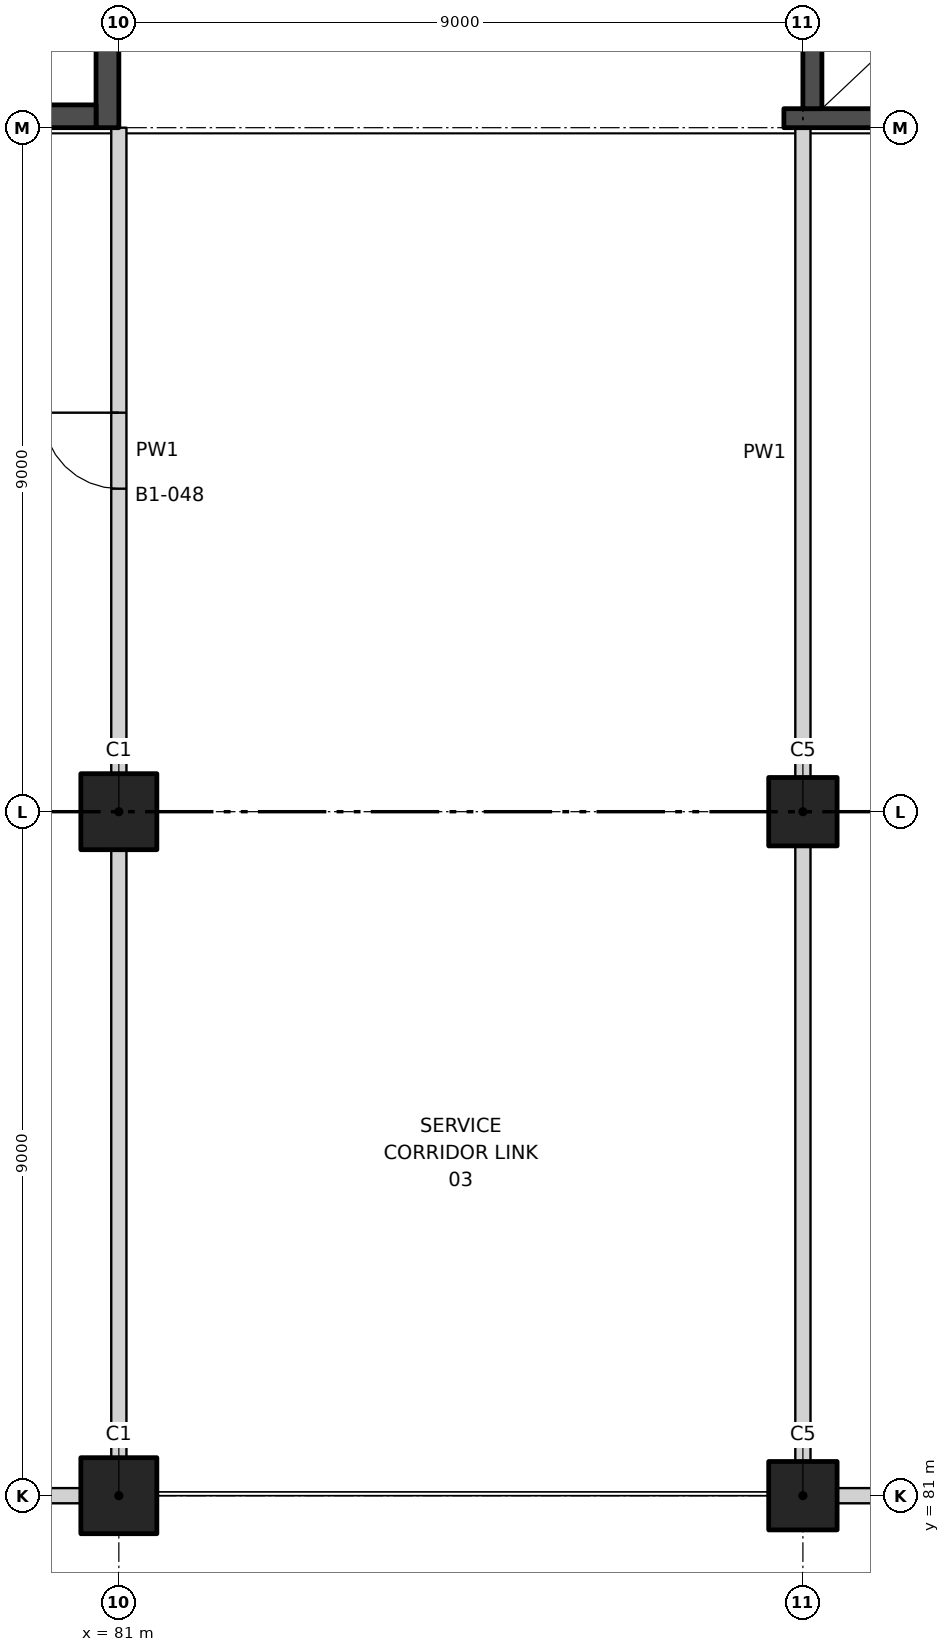
"""IFC4 building model, lengths in metres.
Left out: names, types, materials, properties, quantities, classifications, styles, units other than length and angle.
Written with IfcOpenShell. Run it as: python <this file> out.ifc"""

import sys

from ifc_helpers import new_model, si_unit, direction, frame, frame_2d, origin, origin_2d, place, context, subcontext, project, spatial, rectangle, extrude, element, fill, save


model = new_model("IFC4")
c1 = context("Model", 3, precision=1e-05, world=origin(), true_north=direction((0.0, 1.0)))
c2 = subcontext(c1, "Body", "Model", "MODEL_VIEW")
j1 = project(units=[si_unit("LENGTHUNIT", "METRE"), si_unit("PLANEANGLEUNIT", "RADIAN")], contexts=[c1])
p1 = place(None, origin())
s1 = spatial("IfcSite", under=j1, at=p1, CompositionType="ELEMENT")
p2 = place(p1, origin())
s2 = spatial("IfcBuilding", under=s1, at=p2, CompositionType="ELEMENT")
p3 = place(p2, frame((0.0, 0.0, -6.0)))
s3 = spatial("IfcBuildingStorey", under=s2, at=p3, CompositionType="ELEMENT", Elevation=-6.0)
p4 = place(p3, frame((90.0, 81.0, 0.0), z_axis=(0.0, 0.0, 1.0), x_axis=(1.0, 0.0, 0.0)))
e1 = element("IfcColumn", 1, at=p4, inside=s3, PredefinedType="COLUMN", context=c2, shape_type="SweptSolid", body=[
    extrude(rectangle(XDim=0.9, YDim=0.9, at=origin_2d()), origin(), (0.0, 0.0, 1.0), 6.0),
])
p5 = place(p3, frame((81.0, 81.0, 0.0), z_axis=(0.0, 0.0, 1.0), x_axis=(1.0, 0.0, 0.0)))
e2 = element("IfcColumn", 2, at=p5, inside=s3, PredefinedType="COLUMN", context=c2, shape_type="SweptSolid", body=[
    extrude(rectangle(XDim=1.0, YDim=1.0, at=origin_2d()), origin(), (0.0, 0.0, 1.0), 6.0),
])
p6 = place(p3, frame((90.0, 90.0, 0.0), z_axis=(0.0, 0.0, 1.0), x_axis=(1.0, 0.0, 0.0)))
e3 = element("IfcColumn", 3, at=p6, inside=s3, PredefinedType="COLUMN", context=c2, shape_type="SweptSolid", body=[
    extrude(rectangle(XDim=0.9, YDim=0.9, at=origin_2d()), origin(), (0.0, 0.0, 1.0), 6.0),
])
p7 = place(p3, frame((81.0, 90.0, 0.0), z_axis=(0.0, 0.0, 1.0), x_axis=(1.0, 0.0, 0.0)))
e4 = element("IfcColumn", 4, at=p7, inside=s3, PredefinedType="COLUMN", context=c2, shape_type="SweptSolid", body=[
    extrude(rectangle(XDim=1.0, YDim=1.0, at=origin_2d()), origin(), (0.0, 0.0, 1.0), 6.0),
])
p8 = place(p3, frame((72.2, 81.0, 0.0), z_axis=(0.0, 0.0, 1.0), x_axis=(1.0, 0.0, 0.0)))
e5 = element("IfcWall", 5, at=p8, inside=s3, PredefinedType="PARTITIONING", context=c2, shape_type="SweptSolid", body=[
    extrude(rectangle(XDim=8.3, YDim=0.2, at=frame_2d((4.15, 0.0))), origin(), (0.0, 0.0, 1.0), 4.65),
])
p9 = place(p3, frame((90.45, 81.0, 0.0), z_axis=(0.0, 0.0, 1.0), x_axis=(1.0, 0.0, 0.0)))
e6 = element("IfcWall", 6, at=p9, inside=s3, PredefinedType="PARTITIONING", context=c2, shape_type="SweptSolid", body=[
    extrude(rectangle(XDim=6.3, YDim=0.2, at=frame_2d((3.15, 0.0))), origin(), (0.0, 0.0, 1.0), 4.85),
])
p10 = place(p9, frame((1.05, 0.0, 0.0)))
e7 = element("IfcOpeningElement", 7, at=p10, cuts=e6, PredefinedType="OPENING", context=c2, shape_type="SweptSolid", body=[
    extrude(rectangle(XDim=1.0, YDim=2.1, at=frame_2d((0.5, 1.05))), frame((0.0, 0.11, 0.0), z_axis=(0.0, -1.0, 0.0), x_axis=(1.0, 0.0, 0.0)), (0.0, 0.0, 1.0), 0.22),
])
p11 = place(p3, frame((81.0, 81.5, 0.0), z_axis=(0.0, 0.0, 1.0), x_axis=(0.0, 1.0, 0.0)))
e8 = element("IfcWall", 8, at=p11, inside=s3, PredefinedType="PARTITIONING", context=c2, shape_type="SweptSolid", body=[
    extrude(rectangle(XDim=8.0, YDim=0.2, at=frame_2d((4.0, 0.0))), origin(), (0.0, 0.0, 1.0), 4.65),
])
p12 = place(p3, frame((81.0, 90.5, 0.0), z_axis=(0.0, 0.0, 1.0), x_axis=(0.0, 1.0, 0.0)))
e9 = element("IfcWall", 9, at=p12, inside=s3, PredefinedType="PARTITIONING", context=c2, shape_type="SweptSolid", body=[
    extrude(rectangle(XDim=8.5, YDim=0.2, at=frame_2d((4.25, 0.0))), origin(), (0.0, 0.0, 1.0), 4.55),
])
p13 = place(p12, frame((3.75, 0.0, 0.0)))
e10 = element("IfcOpeningElement", 10, at=p13, cuts=e9, PredefinedType="OPENING", context=c2, shape_type="SweptSolid", body=[
    extrude(rectangle(XDim=1.0, YDim=2.1, at=frame_2d((0.5, 1.05))), frame((0.0, 0.11, 0.0), z_axis=(0.0, -1.0, 0.0), x_axis=(1.0, 0.0, 0.0)), (0.0, 0.0, 1.0), 0.22),
])
p14 = place(p3, frame((90.0, 81.45, 0.0), z_axis=(0.0, 0.0, 1.0), x_axis=(0.0, 1.0, 0.0)))
e11 = element("IfcWall", 11, at=p14, inside=s3, PredefinedType="PARTITIONING", context=c2, shape_type="SweptSolid", body=[
    extrude(rectangle(XDim=8.1, YDim=0.2, at=frame_2d((4.05, 0.0))), origin(), (0.0, 0.0, 1.0), 4.65),
])
p15 = place(p3, frame((90.0, 90.45, 0.0), z_axis=(0.0, 0.0, 1.0), x_axis=(0.0, 1.0, 0.0)))
e12 = element("IfcWall", 12, at=p15, inside=s3, PredefinedType="PARTITIONING", context=c2, shape_type="SweptSolid", body=[
    extrude(rectangle(XDim=8.55, YDim=0.2, at=frame_2d((4.275, 0.0))), origin(), (0.0, 0.0, 1.0), 4.55),
])
p16 = place(p3, frame((80.85, 99.0, 0.0), z_axis=(0.0, 0.0, 1.0), x_axis=(0.0, 1.0, 0.0)))
e13 = element("IfcWall", 13, at=p16, inside=s3, PredefinedType="SHEAR", context=c2, shape_type="SweptSolid", body=[
    extrude(rectangle(XDim=18.0, YDim=0.3, at=frame_2d((9.0, 0.0))), origin(), (0.0, 0.0, 1.0), 6.0),
])
p17 = place(p16, frame((1.5, 0.0, 0.0)))
e14 = element("IfcOpeningElement", 14, at=p17, cuts=e13, PredefinedType="OPENING", context=c2, shape_type="SweptSolid", body=[
    extrude(rectangle(XDim=1.2, YDim=2.1, at=frame_2d((0.6, 1.05))), frame((0.0, 0.16, 0.0), z_axis=(0.0, -1.0, 0.0), x_axis=(1.0, 0.0, 0.0)), (0.0, 0.0, 1.0), 0.32),
])
p18 = place(p3, frame((80.7, 99.15, 0.0), z_axis=(0.0, 0.0, 1.0), x_axis=(-1.0, 0.0, 0.0)))
e15 = element("IfcWall", 15, at=p18, inside=s3, PredefinedType="SHEAR", context=c2, shape_type="SweptSolid", body=[
    extrude(rectangle(XDim=8.4, YDim=0.3, at=frame_2d((4.2, 0.0))), origin(), (0.0, 0.0, 1.0), 6.0),
])
p19 = place(p3, frame((89.75, 99.125, -1.0), z_axis=(0.0, 0.0, 1.0), x_axis=(1.0, 0.0, 0.0)))
e16 = element("IfcWall", 16, at=p19, inside=s3, PredefinedType="SHEAR", context=c2, shape_type="SweptSolid", body=[
    extrude(rectangle(XDim=9.25, YDim=0.25, at=frame_2d((4.625, 0.0))), origin(), (0.0, 0.0, 1.0), 7.0),
])
p20 = place(p3, frame((90.125, 99.25, -1.0), z_axis=(0.0, 0.0, 1.0), x_axis=(0.0, 1.0, 0.0)))
e17 = element("IfcWall", 17, at=p20, inside=s3, PredefinedType="SHEAR", context=c2, shape_type="SweptSolid", body=[
    extrude(rectangle(XDim=2.5, YDim=0.25, at=frame_2d((1.25, 0.0))), origin(), (0.0, 0.0, 1.0), 7.0),
])
p21 = place(p13, origin())
e18 = element("IfcDoor", 18, at=p21, inside=s3, OperationType="SINGLE_SWING_RIGHT", PredefinedType="DOOR", context=c2, shape_type="SweptSolid", body=[
    extrude(rectangle(XDim=1.0, YDim=2.1, at=frame_2d((0.5, 1.05))), frame((0.0, 0.025, 0.0), z_axis=(0.0, -1.0, 0.0), x_axis=(1.0, 0.0, 0.0)), (0.0, 0.0, 1.0), 0.05),
])
fill(e10, e18)
save(model, sys.argv[1])
